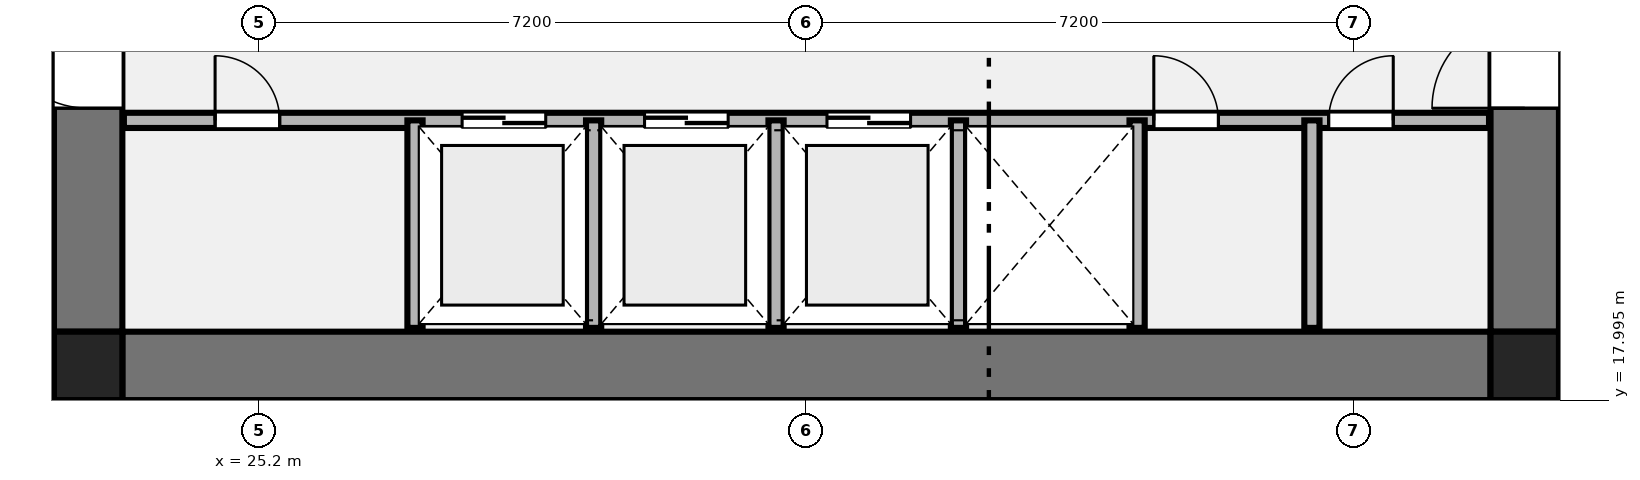
"""IFC4 building model, lengths in metres.
Left out: names, types, materials, properties, quantities, classifications, styles, units other than length and angle.
Written with IfcOpenShell. Run it as: python <this file> out.ifc"""

import sys

from ifc_helpers import new_model, si_unit, direction, frame, frame_2d, origin, origin_2d, place, context, subcontext, project, spatial, rectangle, extrude, element, fill, save


model = new_model("IFC4")
c1 = context("Model", 3, precision=1e-05, world=origin(), true_north=direction((0.0, 1.0)))
c2 = subcontext(c1, "Body", "Model", "MODEL_VIEW")
j1 = project(units=[si_unit("LENGTHUNIT", "METRE"), si_unit("PLANEANGLEUNIT", "RADIAN")], contexts=[c1])
p1 = place(None, origin())
s1 = spatial("IfcSite", under=j1, at=p1, CompositionType="ELEMENT")
p2 = place(p1, origin())
s2 = spatial("IfcBuilding", under=s1, at=p2, CompositionType="ELEMENT")
p3 = place(p2, frame((0.0, 0.0, 24.9)))
s3 = spatial("IfcBuildingStorey", under=s2, at=p3, CompositionType="ELEMENT", Elevation=24.9)
for number, where, z_axis, x_axis in (
    (1, (22.95, 18.45, 0.0), (0.0, 0.0, 1.0), (1.0, 0.0, 0.0)),
    (2, (41.85, 18.45, 0.0), (0.0, 0.0, 1.0), (1.0, 0.0, 0.0)),
):
    element("IfcColumn", number, at=place(p3, frame(where, z_axis=z_axis, x_axis=x_axis)), inside=s3, PredefinedType="COLUMN", context=c2, shape_type="SweptSolid", body=[
        extrude(rectangle(XDim=0.9, YDim=0.9, at=origin_2d()), origin(), (0.0, 0.0, 1.0), 3.55),
    ])
p4 = place(p3, frame((23.4, 18.45, 0.0), z_axis=(0.0, 0.0, 1.0), x_axis=(1.0, 0.0, 0.0)))
e3 = element("IfcWall", 3, at=p4, inside=s3, PredefinedType="SHEAR", context=c2, shape_type="SweptSolid", body=[
    extrude(rectangle(XDim=18.0, YDim=0.9, at=frame_2d((9.0, 0.0))), origin(), (0.0, 0.0, 1.0), 3.33),
])
p5 = place(p3, frame((22.95, 18.9, 0.0), z_axis=(0.0, 0.0, 1.0), x_axis=(0.0, 1.0, 0.0)))
e4 = element("IfcWall", 4, at=p5, inside=s3, PredefinedType="SHEAR", context=c2, shape_type="SweptSolid", body=[
    extrude(rectangle(XDim=14.0, YDim=0.9, at=frame_2d((7.0, 0.0))), origin(), (0.0, 0.0, 1.0), 3.33),
])
p6 = place(p5, frame((2.94, 0.0, 0.0)))
e5 = element("IfcOpeningElement", 5, at=p6, cuts=e4, PredefinedType="OPENING", context=c2, shape_type="SweptSolid", body=[
    extrude(rectangle(XDim=1.22, YDim=2.25, at=frame_2d((0.61, 1.125))), frame((0.0, 0.46, 0.0), z_axis=(0.0, -1.0, 0.0), x_axis=(1.0, 0.0, 0.0)), (0.0, 0.0, 1.0), 0.92),
])
p7 = place(p3, frame((41.85, 18.9, 0.0), z_axis=(0.0, 0.0, 1.0), x_axis=(0.0, 1.0, 0.0)))
e6 = element("IfcWall", 6, at=p7, inside=s3, PredefinedType="SHEAR", context=c2, shape_type="SweptSolid", body=[
    extrude(rectangle(XDim=14.0, YDim=0.9, at=frame_2d((7.0, 0.0))), origin(), (0.0, 0.0, 1.0), 3.33),
])
p8 = place(p7, frame((2.94, 0.0, 0.0)))
e7 = element("IfcOpeningElement", 7, at=p8, cuts=e6, PredefinedType="OPENING", context=c2, shape_type="SweptSolid", body=[
    extrude(rectangle(XDim=1.22, YDim=2.25, at=frame_2d((0.61, 1.125))), frame((0.0, 0.46, 0.0), z_axis=(0.0, -1.0, 0.0), x_axis=(1.0, 0.0, 0.0)), (0.0, 0.0, 1.0), 0.92),
])
p9 = place(p3, frame((23.42, 21.68, 0.0), z_axis=(0.0, 0.0, 1.0), x_axis=(1.0, 0.0, 0.0)))
e8 = element("IfcWall", 8, at=p9, inside=s3, PredefinedType="PLUMBINGWALL", context=c2, shape_type="SweptSolid", body=[
    extrude(rectangle(XDim=17.96, YDim=0.2, at=frame_2d((8.98, 0.0))), origin(), (0.0, 0.0, 1.0), 3.33),
])
p10 = place(p9, frame((4.45, 0.0, 0.0)))
e9 = element("IfcOpeningElement", 9, at=p10, cuts=e8, PredefinedType="OPENING", context=c2, shape_type="SweptSolid", body=[
    extrude(rectangle(XDim=1.1, YDim=2.2, at=frame_2d((0.55, 1.1))), frame((0.0, 0.11, 0.0), z_axis=(0.0, -1.0, 0.0), x_axis=(1.0, 0.0, 0.0)), (0.0, 0.0, 1.0), 0.22),
])
p11 = place(p9, frame((6.85, 0.0, 0.0)))
e10 = element("IfcOpeningElement", 10, at=p11, cuts=e8, PredefinedType="OPENING", context=c2, shape_type="SweptSolid", body=[
    extrude(rectangle(XDim=1.1, YDim=2.2, at=frame_2d((0.55, 1.1))), frame((0.0, 0.11, 0.0), z_axis=(0.0, -1.0, 0.0), x_axis=(1.0, 0.0, 0.0)), (0.0, 0.0, 1.0), 0.22),
])
p12 = place(p9, frame((9.25, 0.0, 0.0)))
e11 = element("IfcOpeningElement", 11, at=p12, cuts=e8, PredefinedType="OPENING", context=c2, shape_type="SweptSolid", body=[
    extrude(rectangle(XDim=1.1, YDim=2.2, at=frame_2d((0.55, 1.1))), frame((0.0, 0.11, 0.0), z_axis=(0.0, -1.0, 0.0), x_axis=(1.0, 0.0, 0.0)), (0.0, 0.0, 1.0), 0.22),
])
p13 = place(p9, frame((1.2, 0.0, 0.0)))
e12 = element("IfcOpeningElement", 12, at=p13, cuts=e8, PredefinedType="OPENING", context=c2, shape_type="SweptSolid", body=[
    extrude(rectangle(XDim=0.85, YDim=2.05, at=frame_2d((0.425, 1.025))), frame((0.0, 0.11, 0.0), z_axis=(0.0, -1.0, 0.0), x_axis=(1.0, 0.0, 0.0)), (0.0, 0.0, 1.0), 0.22),
])
p14 = place(p9, frame((13.55, 0.0, 0.0)))
e13 = element("IfcOpeningElement", 13, at=p14, cuts=e8, PredefinedType="OPENING", context=c2, shape_type="SweptSolid", body=[
    extrude(rectangle(XDim=0.85, YDim=2.05, at=frame_2d((0.425, 1.025))), frame((0.0, 0.11, 0.0), z_axis=(0.0, -1.0, 0.0), x_axis=(1.0, 0.0, 0.0)), (0.0, 0.0, 1.0), 0.22),
])
p15 = place(p9, frame((15.85, 0.0, 0.0)))
e14 = element("IfcOpeningElement", 14, at=p15, cuts=e8, PredefinedType="OPENING", context=c2, shape_type="SweptSolid", body=[
    extrude(rectangle(XDim=0.85, YDim=2.05, at=frame_2d((0.425, 1.025))), frame((0.0, 0.11, 0.0), z_axis=(0.0, -1.0, 0.0), x_axis=(1.0, 0.0, 0.0)), (0.0, 0.0, 1.0), 0.22),
])
for number, where, z_axis, x_axis in (
    (15, (27.25, 18.95, 0.0), (0.0, 0.0, 1.0), (0.0, 1.0, 0.0)),
    (16, (29.6, 18.95, 0.0), (0.0, 0.0, 1.0), (0.0, 1.0, 0.0)),
    (17, (32.0, 18.95, 0.0), (0.0, 0.0, 1.0), (0.0, 1.0, 0.0)),
    (18, (34.4, 18.95, 0.0), (0.0, 0.0, 1.0), (0.0, 1.0, 0.0)),
    (19, (36.75, 18.95, 0.0), (0.0, 0.0, 1.0), (0.0, 1.0, 0.0)),
    (20, (39.05, 18.95, 0.0), (0.0, 0.0, 1.0), (0.0, 1.0, 0.0)),
):
    element("IfcWall", number, at=place(p3, frame(where, z_axis=z_axis, x_axis=x_axis)), inside=s3, PredefinedType="PLUMBINGWALL", context=c2, shape_type="SweptSolid", body=[
        extrude(rectangle(XDim=2.73, YDim=0.2, at=frame_2d((1.365, 0.0))), origin(), (0.0, 0.0, 1.0), 3.33),
    ])
p16 = place(p6, origin())
e21 = element("IfcDoor", 21, at=p16, inside=s3, OperationType="SINGLE_SWING_RIGHT", PredefinedType="DOOR", context=c2, shape_type="SweptSolid", body=[
    extrude(rectangle(XDim=1.22, YDim=2.25, at=frame_2d((0.61, 1.125))), frame((0.0, 0.025, 0.0), z_axis=(0.0, -1.0, 0.0), x_axis=(1.0, 0.0, 0.0)), (0.0, 0.0, 1.0), 0.05),
])
fill(e5, e21)
p17 = place(p8, origin())
e22 = element("IfcDoor", 22, at=p17, inside=s3, OperationType="SINGLE_SWING_LEFT", PredefinedType="DOOR", context=c2, shape_type="SweptSolid", body=[
    extrude(rectangle(XDim=1.22, YDim=2.25, at=frame_2d((0.61, 1.125))), frame((0.0, 0.025, 0.0), z_axis=(0.0, -1.0, 0.0), x_axis=(1.0, 0.0, 0.0)), (0.0, 0.0, 1.0), 0.05),
])
fill(e7, e22)
p18 = place(p10, origin())
e23 = element("IfcDoor", 23, at=p18, inside=s3, OperationType="DOUBLE_DOOR_SLIDING", PredefinedType="DOOR", context=c2, shape_type="SweptSolid", body=[
    extrude(rectangle(XDim=1.1, YDim=2.2, at=frame_2d((0.55, 1.1))), frame((0.0, 0.025, 0.0), z_axis=(0.0, -1.0, 0.0), x_axis=(1.0, 0.0, 0.0)), (0.0, 0.0, 1.0), 0.05),
])
fill(e9, e23)
p19 = place(p11, origin())
e24 = element("IfcDoor", 24, at=p19, inside=s3, OperationType="DOUBLE_DOOR_SLIDING", PredefinedType="DOOR", context=c2, shape_type="SweptSolid", body=[
    extrude(rectangle(XDim=1.1, YDim=2.2, at=frame_2d((0.55, 1.1))), frame((0.0, 0.025, 0.0), z_axis=(0.0, -1.0, 0.0), x_axis=(1.0, 0.0, 0.0)), (0.0, 0.0, 1.0), 0.05),
])
fill(e10, e24)
p20 = place(p12, origin())
e25 = element("IfcDoor", 25, at=p20, inside=s3, OperationType="DOUBLE_DOOR_SLIDING", PredefinedType="DOOR", context=c2, shape_type="SweptSolid", body=[
    extrude(rectangle(XDim=1.1, YDim=2.2, at=frame_2d((0.55, 1.1))), frame((0.0, 0.025, 0.0), z_axis=(0.0, -1.0, 0.0), x_axis=(1.0, 0.0, 0.0)), (0.0, 0.0, 1.0), 0.05),
])
fill(e11, e25)
p21 = place(p13, origin())
e26 = element("IfcDoor", 26, at=p21, inside=s3, OperationType="SINGLE_SWING_LEFT", PredefinedType="DOOR", context=c2, shape_type="SweptSolid", body=[
    extrude(rectangle(XDim=0.85, YDim=2.05, at=frame_2d((0.425, 1.025))), frame((0.0, 0.025, 0.0), z_axis=(0.0, -1.0, 0.0), x_axis=(1.0, 0.0, 0.0)), (0.0, 0.0, 1.0), 0.05),
])
fill(e12, e26)
p22 = place(p14, origin())
e27 = element("IfcDoor", 27, at=p22, inside=s3, OperationType="SINGLE_SWING_LEFT", PredefinedType="DOOR", context=c2, shape_type="SweptSolid", body=[
    extrude(rectangle(XDim=0.85, YDim=2.05, at=frame_2d((0.425, 1.025))), frame((0.0, 0.025, 0.0), z_axis=(0.0, -1.0, 0.0), x_axis=(1.0, 0.0, 0.0)), (0.0, 0.0, 1.0), 0.05),
])
fill(e13, e27)
p23 = place(p15, origin())
e28 = element("IfcDoor", 28, at=p23, inside=s3, OperationType="SINGLE_SWING_RIGHT", PredefinedType="DOOR", context=c2, shape_type="SweptSolid", body=[
    extrude(rectangle(XDim=0.85, YDim=2.05, at=frame_2d((0.425, 1.025))), frame((0.0, 0.025, 0.0), z_axis=(0.0, -1.0, 0.0), x_axis=(1.0, 0.0, 0.0)), (0.0, 0.0, 1.0), 0.05),
])
fill(e14, e28)
save(model, sys.argv[1])
